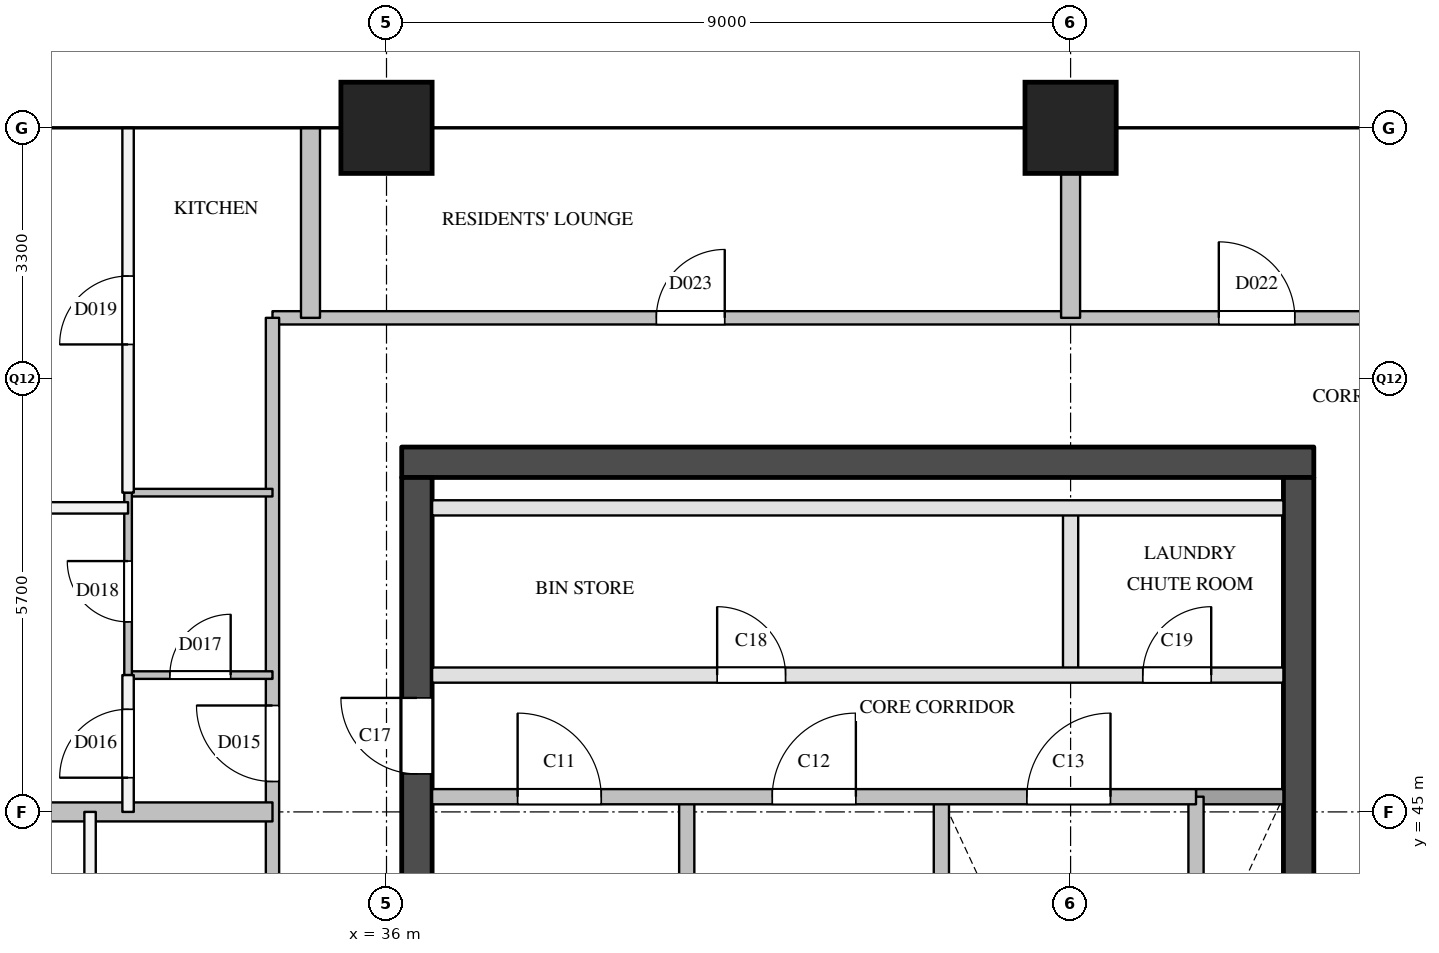
"""IFC4 building model, lengths in metres.
Left out: names, types, materials, properties, quantities, classifications, styles, units other than length and angle.
Written with IfcOpenShell. Run it as: python <this file> out.ifc"""

import sys

from ifc_helpers import new_model, si_unit, direction, frame, frame_2d, origin, origin_2d, place, context, subcontext, project, spatial, rectangle, extrude, element, fill, save


model = new_model("IFC4")
c1 = context("Model", 3, precision=1e-05, world=origin(), true_north=direction((0.0, 1.0)))
c2 = subcontext(c1, "Body", "Model", "MODEL_VIEW")
j1 = project(units=[si_unit("LENGTHUNIT", "METRE"), si_unit("PLANEANGLEUNIT", "RADIAN")], contexts=[c1])
p1 = place(None, origin())
s1 = spatial("IfcSite", under=j1, at=p1, CompositionType="ELEMENT")
p2 = place(p1, origin())
s2 = spatial("IfcBuilding", under=s1, at=p2, CompositionType="ELEMENT")
p3 = place(p2, frame((0.0, 0.0, 242.3)))
s3 = spatial("IfcBuildingStorey", under=s2, at=p3, CompositionType="ELEMENT", Elevation=242.3)
for number, where, z_axis, x_axis in (
    (1, (36.0, 54.0, 0.0), (0.0, 0.0, 1.0), (1.0, 0.0, 0.0)),
    (2, (45.0, 54.0, 0.0), (0.0, 0.0, 1.0), (1.0, 0.0, 0.0)),
):
    element("IfcColumn", number, at=place(p3, frame(where, z_axis=z_axis, x_axis=x_axis)), inside=s3, PredefinedType="COLUMN", context=c2, shape_type="SweptSolid", body=[
        extrude(rectangle(XDim=1.2, YDim=1.2, at=origin_2d()), origin(), (0.0, 0.0, 1.0), 3.9),
    ])
p4 = place(p3, frame((36.2, 49.6, 0.0), z_axis=(0.0, 0.0, 1.0), x_axis=(1.0, 0.0, 0.0)))
e3 = element("IfcWall", 3, at=p4, inside=s3, PredefinedType="SHEAR", context=c2, shape_type="SweptSolid", body=[
    extrude(rectangle(XDim=12.0, YDim=0.4, at=frame_2d((6.0, 0.0))), origin(), (0.0, 0.0, 1.0), 3.6),
])
p5 = place(p3, frame((36.4, 29.1, 0.0), z_axis=(0.0, 0.0, 1.0), x_axis=(0.0, 1.0, 0.0)))
e4 = element("IfcWall", 4, at=p5, inside=s3, PredefinedType="SHEAR", context=c2, shape_type="SweptSolid", body=[
    extrude(rectangle(XDim=20.3, YDim=0.4, at=frame_2d((10.15, 0.0))), origin(), (0.0, 0.0, 1.0), 3.6),
])
p6 = place(p5, frame((3.6, 0.0, 0.0)))
e5 = element("IfcOpeningElement", 5, at=p6, cuts=e4, PredefinedType="OPENING", context=c2, shape_type="SweptSolid", body=[
    extrude(rectangle(XDim=1.8, YDim=2.1, at=frame_2d((0.9, 1.05))), frame((0.0, 0.21, 0.0), z_axis=(0.0, -1.0, 0.0), x_axis=(1.0, 0.0, 0.0)), (0.0, 0.0, 1.0), 0.42),
])
p7 = place(p5, frame((16.4, 0.0, 0.0)))
e6 = element("IfcOpeningElement", 6, at=p7, cuts=e4, PredefinedType="OPENING", context=c2, shape_type="SweptSolid", body=[
    extrude(rectangle(XDim=1.0, YDim=2.1, at=frame_2d((0.5, 1.05))), frame((0.0, 0.21, 0.0), z_axis=(0.0, -1.0, 0.0), x_axis=(1.0, 0.0, 0.0)), (0.0, 0.0, 1.0), 0.42),
])
p8 = place(p3, frame((48.0, 29.1, 0.0), z_axis=(0.0, 0.0, 1.0), x_axis=(0.0, 1.0, 0.0)))
e7 = element("IfcWall", 7, at=p8, inside=s3, PredefinedType="SHEAR", context=c2, shape_type="SweptSolid", body=[
    extrude(rectangle(XDim=20.3, YDim=0.4, at=frame_2d((10.15, 0.0))), origin(), (0.0, 0.0, 1.0), 3.6),
])
p9 = place(p8, frame((12.5, 0.0, 0.0)))
e8 = element("IfcOpeningElement", 8, at=p9, cuts=e7, PredefinedType="OPENING", context=c2, shape_type="SweptSolid", body=[
    extrude(rectangle(XDim=0.7, YDim=2.1, at=frame_2d((0.35, 1.05))), frame((0.0, 0.21, 0.0), z_axis=(0.0, -1.0, 0.0), x_axis=(1.0, 0.0, 0.0)), (0.0, 0.0, 1.0), 0.42),
])
p10 = place(p8, frame((3.9, 0.0, 0.0)))
e9 = element("IfcOpeningElement", 9, at=p10, cuts=e7, PredefinedType="OPENING", context=c2, shape_type="SweptSolid", body=[
    extrude(rectangle(XDim=1.8, YDim=2.1, at=frame_2d((0.9, 1.05))), frame((0.0, 0.21, 0.0), z_axis=(0.0, -1.0, 0.0), x_axis=(1.0, 0.0, 0.0)), (0.0, 0.0, 1.0), 0.42),
])
for number, where, z_axis, x_axis in (
    (10, (39.95, 40.78, 0.0), (0.0, 0.0, 1.0), (0.0, 1.0, 0.0)),
    (11, (43.3, 40.78, 0.0), (0.0, 0.0, 1.0), (0.0, 1.0, 0.0)),
):
    element("IfcWall", number, at=place(p3, frame(where, z_axis=z_axis, x_axis=x_axis)), inside=s3, PredefinedType="SOLIDWALL", context=c2, shape_type="SweptSolid", body=[
        extrude(rectangle(XDim=4.42, YDim=0.2, at=frame_2d((2.21, 0.0))), origin(), (0.0, 0.0, 1.0), 3.6),
    ])
p11 = place(p3, frame((45.0, 46.8, 0.0), z_axis=(0.0, 0.0, 1.0), x_axis=(0.0, 1.0, 0.0)))
e12 = element("IfcWall", 12, at=p11, inside=s3, PredefinedType="PARTITIONING", context=c2, shape_type="SweptSolid", body=[
    extrude(rectangle(XDim=2.2, YDim=0.2, at=frame_2d((1.1, 0.0))), origin(), (0.0, 0.0, 1.0), 3.6),
])
p12 = place(p3, frame((46.65, 40.78, 0.0), z_axis=(0.0, 0.0, 1.0), x_axis=(0.0, 1.0, 0.0)))
e13 = element("IfcWall", 13, at=p12, inside=s3, PredefinedType="SOLIDWALL", context=c2, shape_type="SweptSolid", body=[
    extrude(rectangle(XDim=4.42, YDim=0.2, at=frame_2d((2.21, 0.0))), origin(), (0.0, 0.0, 1.0), 3.6),
])
p13 = place(p3, frame((46.65, 45.2, 0.0), z_axis=(0.0, 0.0, 1.0), x_axis=(1.0, 0.0, 0.0)))
e14 = element("IfcWall", 14, at=p13, inside=s3, PredefinedType="SOLIDWALL", context=c2, shape_type="SweptSolid", body=[
    extrude(rectangle(XDim=1.15, YDim=0.2, at=frame_2d((0.575, 0.0))), origin(), (0.0, 0.0, 1.0), 3.6),
])
p14 = place(p3, frame((36.6, 45.2, 0.0), z_axis=(0.0, 0.0, 1.0), x_axis=(1.0, 0.0, 0.0)))
e15 = element("IfcWall", 15, at=p14, inside=s3, PredefinedType="SOLIDWALL", context=c2, shape_type="SweptSolid", body=[
    extrude(rectangle(XDim=10.05, YDim=0.2, at=frame_2d((5.025, 0.0))), origin(), (0.0, 0.0, 1.0), 3.6),
])
p15 = place(p14, frame((1.125, 0.0, 0.0)))
e16 = element("IfcOpeningElement", 16, at=p15, cuts=e15, PredefinedType="OPENING", context=c2, shape_type="SweptSolid", body=[
    extrude(rectangle(XDim=1.1, YDim=2.1, at=frame_2d((0.55, 1.05))), frame((0.0, 0.11, 0.0), z_axis=(0.0, -1.0, 0.0), x_axis=(1.0, 0.0, 0.0)), (0.0, 0.0, 1.0), 0.22),
])
p16 = place(p14, frame((4.475, 0.0, 0.0)))
e17 = element("IfcOpeningElement", 17, at=p16, cuts=e15, PredefinedType="OPENING", context=c2, shape_type="SweptSolid", body=[
    extrude(rectangle(XDim=1.1, YDim=2.1, at=frame_2d((0.55, 1.05))), frame((0.0, 0.11, 0.0), z_axis=(0.0, -1.0, 0.0), x_axis=(1.0, 0.0, 0.0)), (0.0, 0.0, 1.0), 0.22),
])
p17 = place(p14, frame((7.825, 0.0, 0.0)))
e18 = element("IfcOpeningElement", 18, at=p17, cuts=e15, PredefinedType="OPENING", context=c2, shape_type="SweptSolid", body=[
    extrude(rectangle(XDim=1.1, YDim=2.1, at=frame_2d((0.55, 1.05))), frame((0.0, 0.11, 0.0), z_axis=(0.0, -1.0, 0.0), x_axis=(1.0, 0.0, 0.0)), (0.0, 0.0, 1.0), 0.22),
])
p18 = place(p3, frame((36.6, 46.8, 0.0), z_axis=(0.0, 0.0, 1.0), x_axis=(1.0, 0.0, 0.0)))
e19 = element("IfcWall", 19, at=p18, inside=s3, PredefinedType="PARTITIONING", context=c2, shape_type="SweptSolid", body=[
    extrude(rectangle(XDim=11.2, YDim=0.2, at=frame_2d((5.6, 0.0))), origin(), (0.0, 0.0, 1.0), 3.6),
])
p19 = place(p18, frame((3.75, 0.0, 0.0)))
e20 = element("IfcOpeningElement", 20, at=p19, cuts=e19, PredefinedType="OPENING", context=c2, shape_type="SweptSolid", body=[
    extrude(rectangle(XDim=0.9, YDim=2.1, at=frame_2d((0.45, 1.05))), frame((0.0, 0.11, 0.0), z_axis=(0.0, -1.0, 0.0), x_axis=(1.0, 0.0, 0.0)), (0.0, 0.0, 1.0), 0.22),
])
p20 = place(p18, frame((9.35, 0.0, 0.0)))
e21 = element("IfcOpeningElement", 21, at=p20, cuts=e19, PredefinedType="OPENING", context=c2, shape_type="SweptSolid", body=[
    extrude(rectangle(XDim=0.9, YDim=2.1, at=frame_2d((0.45, 1.05))), frame((0.0, 0.11, 0.0), z_axis=(0.0, -1.0, 0.0), x_axis=(1.0, 0.0, 0.0)), (0.0, 0.0, 1.0), 0.22),
])
p21 = place(p3, frame((36.6, 49.0, 0.0), z_axis=(0.0, 0.0, 1.0), x_axis=(1.0, 0.0, 0.0)))
e22 = element("IfcWall", 22, at=p21, inside=s3, PredefinedType="PARTITIONING", context=c2, shape_type="SweptSolid", body=[
    extrude(rectangle(XDim=11.2, YDim=0.2, at=frame_2d((5.6, 0.0))), origin(), (0.0, 0.0, 1.0), 3.6),
])
p22 = place(p3, frame((34.5, 51.5, 0.0), z_axis=(0.0, 0.0, 1.0), x_axis=(1.0, 0.0, 0.0)))
e23 = element("IfcWall", 23, at=p22, inside=s3, PredefinedType="PARTITIONING", context=c2, shape_type="SweptSolid", body=[
    extrude(rectangle(XDim=15.4, YDim=0.175, at=frame_2d((7.7, 0.0))), origin(), (0.0, 0.0, 1.0), 3.6),
])
p23 = place(p22, frame((12.45, 0.0, 0.0)))
e24 = element("IfcOpeningElement", 24, at=p23, cuts=e23, PredefinedType="OPENING", context=c2, shape_type="SweptSolid", body=[
    extrude(rectangle(XDim=1.0, YDim=2.1, at=frame_2d((0.5, 1.05))), frame((0.0, 0.097, 0.0), z_axis=(0.0, -1.0, 0.0), x_axis=(1.0, 0.0, 0.0)), (0.0, 0.0, 1.0), 0.195),
])
p24 = place(p22, frame((5.05, 0.0, 0.0)))
e25 = element("IfcOpeningElement", 25, at=p24, cuts=e23, PredefinedType="OPENING", context=c2, shape_type="SweptSolid", body=[
    extrude(rectangle(XDim=0.9, YDim=2.1, at=frame_2d((0.45, 1.05))), frame((0.0, 0.097, 0.0), z_axis=(0.0, -1.0, 0.0), x_axis=(1.0, 0.0, 0.0)), (0.0, 0.0, 1.0), 0.195),
])
p25 = place(p3, frame((34.5, 28.5, 0.0), z_axis=(0.0, 0.0, 1.0), x_axis=(0.0, 1.0, 0.0)))
e26 = element("IfcWall", 26, at=p25, inside=s3, PredefinedType="PARTITIONING", context=c2, shape_type="SweptSolid", body=[
    extrude(rectangle(XDim=23.0, YDim=0.175, at=frame_2d((11.5, 0.0))), origin(), (0.0, 0.0, 1.0), 3.6),
])
p26 = place(p25, frame((5.1, 0.0, 0.0)))
e27 = element("IfcOpeningElement", 27, at=p26, cuts=e26, PredefinedType="OPENING", context=c2, shape_type="SweptSolid", body=[
    extrude(rectangle(XDim=1.0, YDim=2.1, at=frame_2d((0.5, 1.05))), frame((0.0, 0.097, 0.0), z_axis=(0.0, -1.0, 0.0), x_axis=(1.0, 0.0, 0.0)), (0.0, 0.0, 1.0), 0.195),
])
p27 = place(p25, frame((6.9, 0.0, 0.0)))
e28 = element("IfcOpeningElement", 28, at=p27, cuts=e26, PredefinedType="OPENING", context=c2, shape_type="SweptSolid", body=[
    extrude(rectangle(XDim=1.0, YDim=2.1, at=frame_2d((0.5, 1.05))), frame((0.0, 0.097, 0.0), z_axis=(0.0, -1.0, 0.0), x_axis=(1.0, 0.0, 0.0)), (0.0, 0.0, 1.0), 0.195),
])
p28 = place(p25, frame((16.9, 0.0, 0.0)))
e29 = element("IfcOpeningElement", 29, at=p28, cuts=e26, PredefinedType="OPENING", context=c2, shape_type="SweptSolid", body=[
    extrude(rectangle(XDim=1.0, YDim=2.1, at=frame_2d((0.5, 1.05))), frame((0.0, 0.097, 0.0), z_axis=(0.0, -1.0, 0.0), x_axis=(1.0, 0.0, 0.0)), (0.0, 0.0, 1.0), 0.195),
])
p29 = place(p3, frame((18.0, 49.0, 0.0), z_axis=(0.0, 0.0, 1.0), x_axis=(1.0, 0.0, 0.0)))
e30 = element("IfcWall", 30, at=p29, inside=s3, PredefinedType="PARTITIONING", context=c2, shape_type="SweptSolid", body=[
    extrude(rectangle(XDim=14.6, YDim=0.15, at=frame_2d((7.3, 0.0))), origin(), (0.0, 0.0, 1.0), 2.6),
])
p30 = place(p29, frame((10.533, 0.0, 0.0)))
e31 = element("IfcOpeningElement", 31, at=p30, cuts=e30, PredefinedType="OPENING", context=c2, shape_type="SweptSolid", body=[
    extrude(rectangle(XDim=0.9, YDim=2.1, at=frame_2d((0.45, 1.05))), frame((0.0, 0.085, 0.0), z_axis=(0.0, -1.0, 0.0), x_axis=(1.0, 0.0, 0.0)), (0.0, 0.0, 1.0), 0.17),
])
p31 = place(p29, frame((3.233, 0.0, 0.0)))
e32 = element("IfcOpeningElement", 32, at=p31, cuts=e30, PredefinedType="OPENING", context=c2, shape_type="SweptSolid", body=[
    extrude(rectangle(XDim=0.9, YDim=2.1, at=frame_2d((0.45, 1.05))), frame((0.0, 0.085, 0.0), z_axis=(0.0, -1.0, 0.0), x_axis=(1.0, 0.0, 0.0)), (0.0, 0.0, 1.0), 0.17),
])
p32 = place(p3, frame((32.1, 39.2, 0.0), z_axis=(0.0, 0.0, 1.0), x_axis=(0.0, 1.0, 0.0)))
e33 = element("IfcWall", 33, at=p32, inside=s3, PredefinedType="PARTITIONING", context=c2, shape_type="SweptSolid", body=[
    extrude(rectangle(XDim=5.8, YDim=0.15, at=frame_2d((2.9, 0.0))), origin(), (0.0, 0.0, 1.0), 3.6),
])
p33 = place(p32, frame((2.85, 0.0, 0.0)))
e34 = element("IfcOpeningElement", 34, at=p33, cuts=e33, PredefinedType="OPENING", context=c2, shape_type="SweptSolid", body=[
    extrude(rectangle(XDim=0.9, YDim=2.1, at=frame_2d((0.45, 1.05))), frame((0.0, 0.085, 0.0), z_axis=(0.0, -1.0, 0.0), x_axis=(1.0, 0.0, 0.0)), (0.0, 0.0, 1.0), 0.17),
])
p34 = place(p3, frame((32.6, 45.0, 0.0), z_axis=(0.0, 0.0, 1.0), x_axis=(0.0, 1.0, 0.0)))
e35 = element("IfcWall", 35, at=p34, inside=s3, PredefinedType="PARTITIONING", context=c2, shape_type="SweptSolid", body=[
    extrude(rectangle(XDim=1.8, YDim=0.15, at=frame_2d((0.9, 0.0))), origin(), (0.0, 0.0, 1.0), 3.6),
])
p35 = place(p34, frame((0.45, 0.0, 0.0)))
e36 = element("IfcOpeningElement", 36, at=p35, cuts=e35, PredefinedType="OPENING", context=c2, shape_type="SweptSolid", body=[
    extrude(rectangle(XDim=0.9, YDim=2.1, at=frame_2d((0.45, 1.05))), frame((0.0, 0.085, 0.0), z_axis=(0.0, -1.0, 0.0), x_axis=(1.0, 0.0, 0.0)), (0.0, 0.0, 1.0), 0.17),
])
p36 = place(p3, frame((32.6, 49.2, 0.0), z_axis=(0.0, 0.0, 1.0), x_axis=(0.0, 1.0, 0.0)))
e37 = element("IfcWall", 37, at=p36, inside=s3, PredefinedType="PARTITIONING", context=c2, shape_type="SweptSolid", body=[
    extrude(rectangle(XDim=4.8, YDim=0.15, at=frame_2d((2.4, 0.0))), origin(), (0.0, 0.0, 1.0), 2.6),
])
p37 = place(p36, frame((1.95, 0.0, 0.0)))
e38 = element("IfcOpeningElement", 38, at=p37, cuts=e37, PredefinedType="OPENING", context=c2, shape_type="SweptSolid", body=[
    extrude(rectangle(XDim=0.9, YDim=2.1, at=frame_2d((0.45, 1.05))), frame((0.0, 0.085, 0.0), z_axis=(0.0, -1.0, 0.0), x_axis=(1.0, 0.0, 0.0)), (0.0, 0.0, 1.0), 0.17),
])
p38 = place(p3, frame((18.0, 45.0, 0.0), z_axis=(0.0, 0.0, 1.0), x_axis=(1.0, 0.0, 0.0)))
e39 = element("IfcWall", 39, at=p38, inside=s3, PredefinedType="PARTITIONING", context=c2, shape_type="SweptSolid", body=[
    extrude(rectangle(XDim=16.5, YDim=0.25, at=frame_2d((8.25, 0.0))), origin(), (0.0, 0.0, 1.0), 3.6),
])
p39 = place(p3, frame((35.0, 51.5, 0.0), z_axis=(0.0, 0.0, 1.0), x_axis=(0.0, 1.0, 0.0)))
e40 = element("IfcWall", 40, at=p39, inside=s3, PredefinedType="PARTITIONING", context=c2, shape_type="SweptSolid", body=[
    extrude(rectangle(XDim=2.5, YDim=0.25, at=frame_2d((1.25, 0.0))), origin(), (0.0, 0.0, 1.0), 2.6),
])
p40 = place(p3, frame((45.0, 51.5, 0.0), z_axis=(0.0, 0.0, 1.0), x_axis=(0.0, 1.0, 0.0)))
e41 = element("IfcWall", 41, at=p40, inside=s3, PredefinedType="PARTITIONING", context=c2, shape_type="SweptSolid", body=[
    extrude(rectangle(XDim=2.5, YDim=0.25, at=frame_2d((1.25, 0.0))), origin(), (0.0, 0.0, 1.0), 3.6),
])
p41 = place(p3, frame((32.6, 46.8, 0.0), z_axis=(0.0, 0.0, 1.0), x_axis=(1.0, 0.0, 0.0)))
e42 = element("IfcWall", 42, at=p41, inside=s3, PredefinedType="PARTITIONING", context=c2, shape_type="SweptSolid", body=[
    extrude(rectangle(XDim=1.9, YDim=0.1, at=frame_2d((0.95, 0.0))), origin(), (0.0, 0.0, 1.0), 3.6),
])
p42 = place(p41, frame((0.55, 0.0, 0.0)))
e43 = element("IfcOpeningElement", 43, at=p42, cuts=e42, PredefinedType="OPENING", context=c2, shape_type="SweptSolid", body=[
    extrude(rectangle(XDim=0.8, YDim=2.1, at=frame_2d((0.4, 1.05))), frame((0.0, 0.06, 0.0), z_axis=(0.0, -1.0, 0.0), x_axis=(1.0, 0.0, 0.0)), (0.0, 0.0, 1.0), 0.12),
])
p43 = place(p3, frame((32.6, 49.2, 0.0), z_axis=(0.0, 0.0, 1.0), x_axis=(1.0, 0.0, 0.0)))
e44 = element("IfcWall", 44, at=p43, inside=s3, PredefinedType="PARTITIONING", context=c2, shape_type="SweptSolid", body=[
    extrude(rectangle(XDim=1.9, YDim=0.1, at=frame_2d((0.95, 0.0))), origin(), (0.0, 0.0, 1.0), 3.6),
])
p44 = place(p3, frame((32.6, 46.8, 0.0), z_axis=(0.0, 0.0, 1.0), x_axis=(0.0, 1.0, 0.0)))
e45 = element("IfcWall", 45, at=p44, inside=s3, PredefinedType="PARTITIONING", context=c2, shape_type="SweptSolid", body=[
    extrude(rectangle(XDim=2.4, YDim=0.1, at=frame_2d((1.2, 0.0))), origin(), (0.0, 0.0, 1.0), 3.6),
])
p45 = place(p44, frame((0.7, 0.0, 0.0)))
e46 = element("IfcOpeningElement", 46, at=p45, cuts=e45, PredefinedType="OPENING", context=c2, shape_type="SweptSolid", body=[
    extrude(rectangle(XDim=0.8, YDim=2.1, at=frame_2d((0.4, 1.05))), frame((0.0, 0.06, 0.0), z_axis=(0.0, -1.0, 0.0), x_axis=(1.0, 0.0, 0.0)), (0.0, 0.0, 1.0), 0.12),
])
p46 = place(p15, origin())
e47 = element("IfcDoor", 47, at=p46, inside=s3, OperationType="SINGLE_SWING_LEFT", PredefinedType="DOOR", context=c2, shape_type="SweptSolid", body=[
    extrude(rectangle(XDim=1.1, YDim=2.1, at=frame_2d((0.55, 1.05))), frame((0.0, 0.025, 0.0), z_axis=(0.0, -1.0, 0.0), x_axis=(1.0, 0.0, 0.0)), (0.0, 0.0, 1.0), 0.05),
])
fill(e16, e47)
p47 = place(p16, origin())
e48 = element("IfcDoor", 48, at=p47, inside=s3, OperationType="SINGLE_SWING_RIGHT", PredefinedType="DOOR", context=c2, shape_type="SweptSolid", body=[
    extrude(rectangle(XDim=1.1, YDim=2.1, at=frame_2d((0.55, 1.05))), frame((0.0, 0.025, 0.0), z_axis=(0.0, -1.0, 0.0), x_axis=(1.0, 0.0, 0.0)), (0.0, 0.0, 1.0), 0.05),
])
fill(e17, e48)
p48 = place(p17, origin())
e49 = element("IfcDoor", 49, at=p48, inside=s3, OperationType="SINGLE_SWING_RIGHT", PredefinedType="DOOR", context=c2, shape_type="SweptSolid", body=[
    extrude(rectangle(XDim=1.1, YDim=2.1, at=frame_2d((0.55, 1.05))), frame((0.0, 0.025, 0.0), z_axis=(0.0, -1.0, 0.0), x_axis=(1.0, 0.0, 0.0)), (0.0, 0.0, 1.0), 0.05),
])
fill(e18, e49)
p49 = place(p7, origin())
e50 = element("IfcDoor", 50, at=p49, inside=s3, OperationType="SINGLE_SWING_RIGHT", PredefinedType="DOOR", context=c2, shape_type="SweptSolid", body=[
    extrude(rectangle(XDim=1.0, YDim=2.1, at=frame_2d((0.5, 1.05))), frame((0.0, 0.025, 0.0), z_axis=(0.0, -1.0, 0.0), x_axis=(1.0, 0.0, 0.0)), (0.0, 0.0, 1.0), 0.05),
])
fill(e6, e50)
p50 = place(p19, origin())
e51 = element("IfcDoor", 51, at=p50, inside=s3, OperationType="SINGLE_SWING_LEFT", PredefinedType="DOOR", context=c2, shape_type="SweptSolid", body=[
    extrude(rectangle(XDim=0.9, YDim=2.1, at=frame_2d((0.45, 1.05))), frame((0.0, 0.025, 0.0), z_axis=(0.0, -1.0, 0.0), x_axis=(1.0, 0.0, 0.0)), (0.0, 0.0, 1.0), 0.05),
])
fill(e20, e51)
p51 = place(p20, origin())
e52 = element("IfcDoor", 52, at=p51, inside=s3, OperationType="SINGLE_SWING_RIGHT", PredefinedType="DOOR", context=c2, shape_type="SweptSolid", body=[
    extrude(rectangle(XDim=0.9, YDim=2.1, at=frame_2d((0.45, 1.05))), frame((0.0, 0.025, 0.0), z_axis=(0.0, -1.0, 0.0), x_axis=(1.0, 0.0, 0.0)), (0.0, 0.0, 1.0), 0.05),
])
fill(e21, e52)
p52 = place(p28, origin())
e53 = element("IfcDoor", 53, at=p52, inside=s3, OperationType="SINGLE_SWING_RIGHT", PredefinedType="DOOR", context=c2, shape_type="SweptSolid", body=[
    extrude(rectangle(XDim=1.0, YDim=2.1, at=frame_2d((0.5, 1.05))), frame((0.0, 0.025, 0.0), z_axis=(0.0, -1.0, 0.0), x_axis=(1.0, 0.0, 0.0)), (0.0, 0.0, 1.0), 0.05),
])
fill(e29, e53)
p53 = place(p35, origin())
e54 = element("IfcDoor", 54, at=p53, inside=s3, OperationType="SINGLE_SWING_LEFT", PredefinedType="DOOR", context=c2, shape_type="SweptSolid", body=[
    extrude(rectangle(XDim=0.9, YDim=2.1, at=frame_2d((0.45, 1.05))), frame((0.0, 0.025, 0.0), z_axis=(0.0, -1.0, 0.0), x_axis=(1.0, 0.0, 0.0)), (0.0, 0.0, 1.0), 0.05),
])
fill(e36, e54)
p54 = place(p42, origin())
e55 = element("IfcDoor", 55, at=p54, inside=s3, OperationType="SINGLE_SWING_RIGHT", PredefinedType="DOOR", context=c2, shape_type="SweptSolid", body=[
    extrude(rectangle(XDim=0.8, YDim=2.1, at=frame_2d((0.4, 1.05))), frame((0.0, 0.025, 0.0), z_axis=(0.0, -1.0, 0.0), x_axis=(1.0, 0.0, 0.0)), (0.0, 0.0, 1.0), 0.05),
])
fill(e43, e55)
p55 = place(p45, origin())
e56 = element("IfcDoor", 56, at=p55, inside=s3, OperationType="SINGLE_SWING_RIGHT", PredefinedType="DOOR", context=c2, shape_type="SweptSolid", body=[
    extrude(rectangle(XDim=0.8, YDim=2.1, at=frame_2d((0.4, 1.05))), frame((0.0, 0.025, 0.0), z_axis=(0.0, -1.0, 0.0), x_axis=(1.0, 0.0, 0.0)), (0.0, 0.0, 1.0), 0.05),
])
fill(e46, e56)
p56 = place(p37, origin())
e57 = element("IfcDoor", 57, at=p56, inside=s3, OperationType="SINGLE_SWING_LEFT", PredefinedType="DOOR", context=c2, shape_type="SweptSolid", body=[
    extrude(rectangle(XDim=0.9, YDim=2.1, at=frame_2d((0.45, 1.05))), frame((0.0, 0.025, 0.0), z_axis=(0.0, -1.0, 0.0), x_axis=(1.0, 0.0, 0.0)), (0.0, 0.0, 1.0), 0.05),
])
fill(e38, e57)
p57 = place(p23, origin())
e58 = element("IfcDoor", 58, at=p57, inside=s3, OperationType="SINGLE_SWING_LEFT", PredefinedType="DOOR", context=c2, shape_type="SweptSolid", body=[
    extrude(rectangle(XDim=1.0, YDim=2.1, at=frame_2d((0.5, 1.05))), frame((0.0, 0.025, 0.0), z_axis=(0.0, -1.0, 0.0), x_axis=(1.0, 0.0, 0.0)), (0.0, 0.0, 1.0), 0.05),
])
fill(e24, e58)
p58 = place(p24, origin())
e59 = element("IfcDoor", 59, at=p58, inside=s3, OperationType="SINGLE_SWING_RIGHT", PredefinedType="DOOR", context=c2, shape_type="SweptSolid", body=[
    extrude(rectangle(XDim=0.9, YDim=2.1, at=frame_2d((0.45, 1.05))), frame((0.0, 0.025, 0.0), z_axis=(0.0, -1.0, 0.0), x_axis=(1.0, 0.0, 0.0)), (0.0, 0.0, 1.0), 0.05),
])
fill(e25, e59)
save(model, sys.argv[1])
